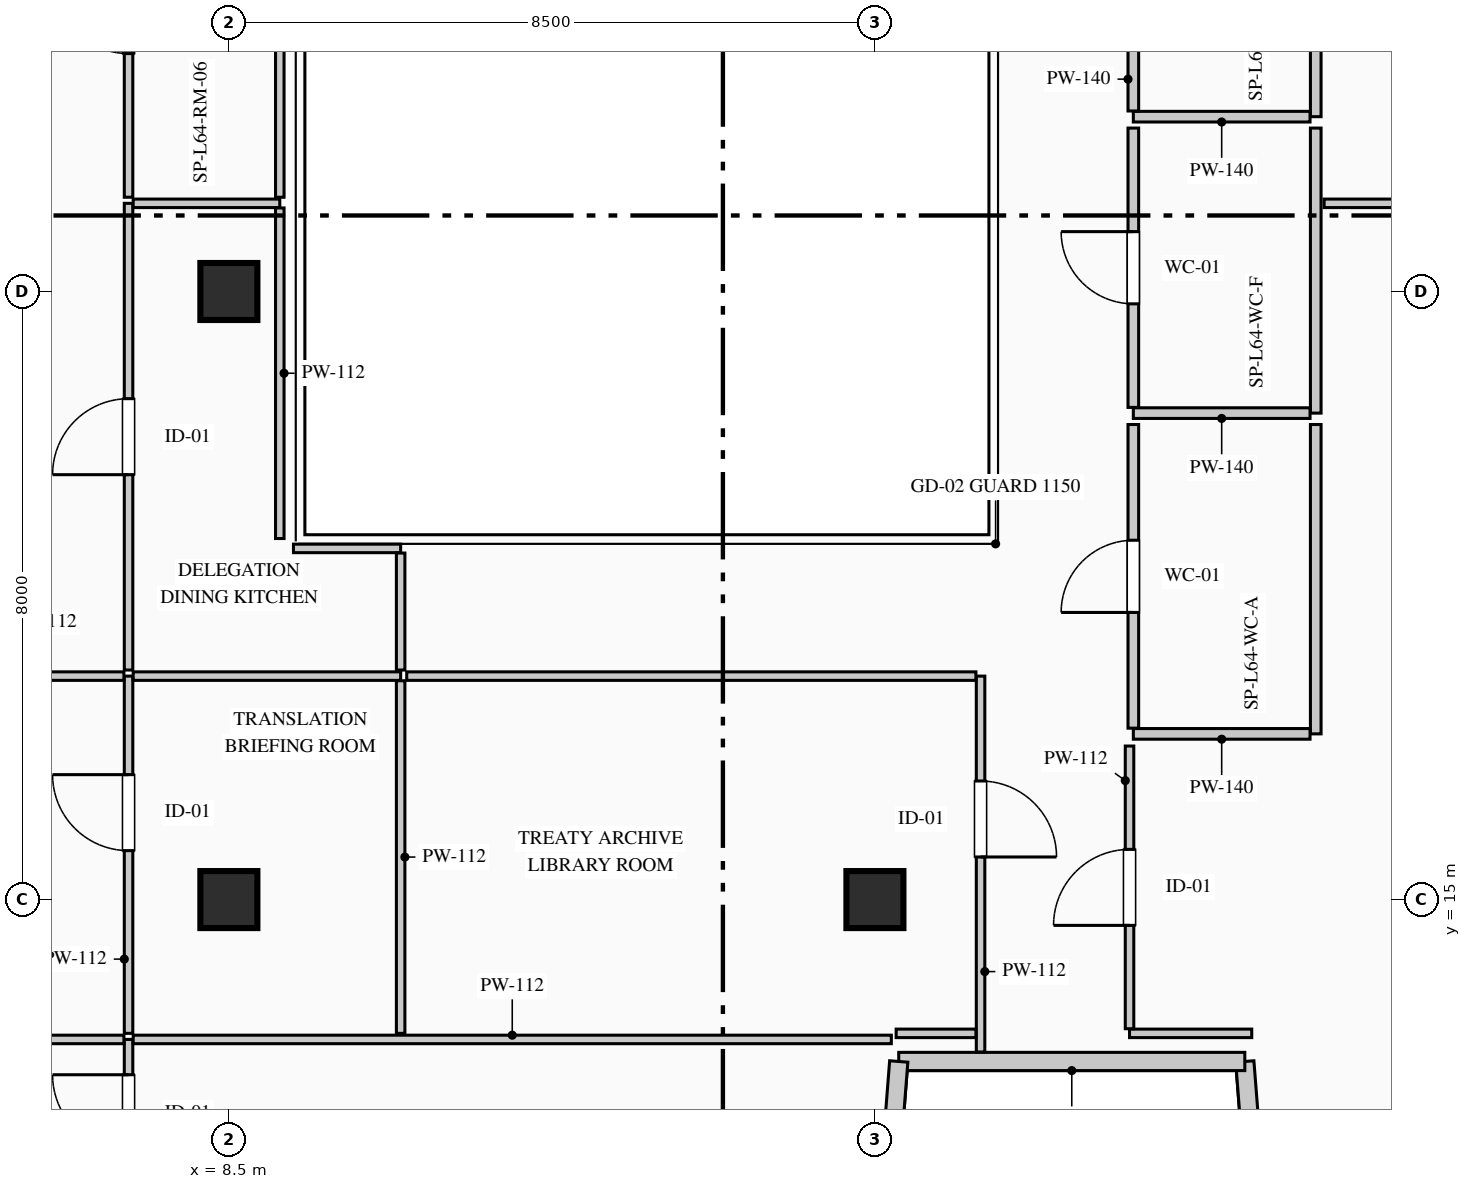
"""IFC4 building model, lengths in metres.
Left out: names, types, materials, properties, quantities, classifications, styles, units other than length and angle.
Written with IfcOpenShell. Run it as: python <this file> out.ifc"""

import sys

from ifc_helpers import new_model, si_unit, direction, frame, frame_2d, origin, origin_2d, place, context, subcontext, project, spatial, rectangle, extrude, element, fill, save


model = new_model("IFC4")
c1 = context("Model", 3, precision=1e-05, world=origin(), true_north=direction((0.0, 1.0)))
c2 = subcontext(c1, "Body", "Model", "MODEL_VIEW")
j1 = project(units=[si_unit("LENGTHUNIT", "METRE"), si_unit("PLANEANGLEUNIT", "RADIAN")], contexts=[c1])
p1 = place(None, origin())
s1 = spatial("IfcSite", under=j1, at=p1, CompositionType="ELEMENT")
p2 = place(p1, origin())
s2 = spatial("IfcBuilding", under=s1, at=p2, CompositionType="ELEMENT")
p3 = place(p2, frame((0.0, 0.0, 268.55)))
s3 = spatial("IfcBuildingStorey", under=s2, at=p3, CompositionType="ELEMENT", Elevation=268.55)
for number, where, z_axis, x_axis in (
    (1, (8.5, 15.0, 0.0), (0.0, 0.0, 1.0), (1.0, 0.0, 0.0)),
    (2, (8.5, 23.0, 0.0), (0.0, 0.0, 1.0), (1.0, 0.0, 0.0)),
    (3, (17.0, 15.0, 0.0), (0.0, 0.0, 1.0), (1.0, 0.0, 0.0)),
):
    element("IfcColumn", number, at=place(p3, frame(where, z_axis=z_axis, x_axis=x_axis)), inside=s3, PredefinedType="COLUMN", context=c2, shape_type="SweptSolid", body=[
        extrude(rectangle(XDim=0.75, YDim=0.75, at=origin_2d()), origin(), (0.0, 0.0, 1.0), 3.95),
    ])
p4 = place(p3, frame((6.133, 4.42, 0.0), z_axis=(0.0, 0.0, 1.0), x_axis=(-0.089522678378, 0.995984784048, 0.0)))
e4 = element("IfcWall", 4, at=p4, inside=s3, PredefinedType="STANDARD", context=c2, shape_type="SweptSolid", body=[
    extrude(rectangle(XDim=37.31, YDim=0.24, at=frame_2d((18.655, 0.0))), origin(), (0.0, 0.0, 1.0), 3.7),
])
p5 = place(p4, frame((10.246, 0.0, 0.9)))
e5 = element("IfcOpeningElement", 5, at=p5, cuts=e4, PredefinedType="OPENING", context=c2, shape_type="SweptSolid", body=[
    extrude(rectangle(XDim=1.65, YDim=1.95, at=frame_2d((0.825, 0.975))), frame((0.0, 0.13, 0.0), z_axis=(0.0, -1.0, 0.0), x_axis=(1.0, 0.0, 0.0)), (0.0, 0.0, 1.0), 0.26),
])
p6 = place(p3, frame((22.667, 2.62, 0.0), z_axis=(0.0, 0.0, 1.0), x_axis=(-0.077816860153, 0.996967670627, 0.0)))
e6 = element("IfcWall", 6, at=p6, inside=s3, PredefinedType="STANDARD", context=c2, shape_type="SweptSolid", body=[
    extrude(rectangle(XDim=10.281, YDim=0.24, at=frame_2d((5.141, 0.0))), origin(), (0.0, 0.0, 1.0), 3.7),
])
p7 = place(p6, frame((5.755, 0.0, 0.9)))
e7 = element("IfcOpeningElement", 7, at=p7, cuts=e6, PredefinedType="OPENING", context=c2, shape_type="SweptSolid", body=[
    extrude(rectangle(XDim=1.65, YDim=1.95, at=frame_2d((0.825, 0.975))), frame((0.0, 0.13, 0.0), z_axis=(0.0, -1.0, 0.0), x_axis=(1.0, 0.0, 0.0)), (0.0, 0.0, 1.0), 0.26),
])
p8 = place(p3, frame((21.867, 12.87, 0.0), z_axis=(0.0, 0.0, 1.0), x_axis=(-1.0, 0.0, 0.0)))
e8 = element("IfcWall", 8, at=p8, inside=s3, PredefinedType="STANDARD", context=c2, shape_type="SweptSolid", body=[
    extrude(rectangle(XDim=4.553, YDim=0.24, at=frame_2d((2.277, 0.0))), origin(), (0.0, 0.0, 1.0), 3.7),
])
p9 = place(p3, frame((17.313, 12.87, 0.0), z_axis=(0.0, 0.0, 1.0), x_axis=(-0.077816860153, -0.996967670627, 0.0)))
e9 = element("IfcWall", 9, at=p9, inside=s3, PredefinedType="STANDARD", context=c2, shape_type="SweptSolid", body=[
    extrude(rectangle(XDim=10.281, YDim=0.24, at=frame_2d((5.141, 0.0))), origin(), (0.0, 0.0, 1.0), 3.7),
])
p10 = place(p3, frame((22.8, 28.95, 0.0), z_axis=(0.0, 0.0, 1.0), x_axis=(0.0, -1.0, 0.0)))
e10 = element("IfcWall", 10, at=p10, inside=s3, PredefinedType="PARTITIONING", context=c2, shape_type="SweptSolid", body=[
    extrude(rectangle(XDim=3.65, YDim=0.14, at=frame_2d((1.825, 0.0))), origin(), (0.0, 0.0, 1.0), 3.285),
])
p11 = place(p3, frame((22.725, 25.3, 0.0), z_axis=(0.0, 0.0, 1.0), x_axis=(-1.0, 0.0, 0.0)))
e11 = element("IfcWall", 11, at=p11, inside=s3, PredefinedType="PARTITIONING", context=c2, shape_type="SweptSolid", body=[
    extrude(rectangle(XDim=2.325, YDim=0.14, at=frame_2d((1.163, 0.0))), origin(), (0.0, 0.0, 1.0), 3.7),
])
p12 = place(p3, frame((20.4, 25.375, 0.0), z_axis=(0.0, 0.0, 1.0), x_axis=(0.0, 1.0, 0.0)))
e12 = element("IfcWall", 12, at=p12, inside=s3, PredefinedType="PARTITIONING", context=c2, shape_type="SweptSolid", body=[
    extrude(rectangle(XDim=3.575, YDim=0.14, at=frame_2d((1.788, 0.0))), origin(), (0.0, 0.0, 1.0), 3.7),
])
p13 = place(p12, frame((1.312, 0.0, 0.0)))
e13 = element("IfcOpeningElement", 13, at=p13, cuts=e12, PredefinedType="OPENING", context=c2, shape_type="SweptSolid", body=[
    extrude(rectangle(XDim=0.95, YDim=2.15, at=frame_2d((0.475, 1.075))), frame((0.0, 0.08, 0.0), z_axis=(0.0, -1.0, 0.0), x_axis=(1.0, 0.0, 0.0)), (0.0, 0.0, 1.0), 0.16),
])
p14 = place(p3, frame((22.8, 25.15, 0.0), z_axis=(0.0, 0.0, 1.0), x_axis=(0.0, -1.0, 0.0)))
e14 = element("IfcWall", 14, at=p14, inside=s3, PredefinedType="PARTITIONING", context=c2, shape_type="SweptSolid", body=[
    extrude(rectangle(XDim=3.75, YDim=0.14, at=frame_2d((1.875, 0.0))), origin(), (0.0, 0.0, 1.0), 3.285),
])
p15 = place(p3, frame((22.725, 21.4, 0.0), z_axis=(0.0, 0.0, 1.0), x_axis=(-1.0, 0.0, 0.0)))
e15 = element("IfcWall", 15, at=p15, inside=s3, PredefinedType="PARTITIONING", context=c2, shape_type="SweptSolid", body=[
    extrude(rectangle(XDim=2.325, YDim=0.14, at=frame_2d((1.163, 0.0))), origin(), (0.0, 0.0, 1.0), 3.7),
])
p16 = place(p3, frame((20.4, 21.475, 0.0), z_axis=(0.0, 0.0, 1.0), x_axis=(0.0, 1.0, 0.0)))
e16 = element("IfcWall", 16, at=p16, inside=s3, PredefinedType="PARTITIONING", context=c2, shape_type="SweptSolid", body=[
    extrude(rectangle(XDim=3.675, YDim=0.14, at=frame_2d((1.837, 0.0))), origin(), (0.0, 0.0, 1.0), 3.7),
])
p17 = place(p16, frame((1.363, 0.0, 0.0)))
e17 = element("IfcOpeningElement", 17, at=p17, cuts=e16, PredefinedType="OPENING", context=c2, shape_type="SweptSolid", body=[
    extrude(rectangle(XDim=0.95, YDim=2.15, at=frame_2d((0.475, 1.075))), frame((0.0, 0.08, 0.0), z_axis=(0.0, -1.0, 0.0), x_axis=(1.0, 0.0, 0.0)), (0.0, 0.0, 1.0), 0.16),
])
p18 = place(p3, frame((22.8, 21.25, 0.0), z_axis=(0.0, 0.0, 1.0), x_axis=(0.0, -1.0, 0.0)))
e18 = element("IfcWall", 18, at=p18, inside=s3, PredefinedType="PARTITIONING", context=c2, shape_type="SweptSolid", body=[
    extrude(rectangle(XDim=4.07, YDim=0.14, at=frame_2d((2.035, 0.0))), origin(), (0.0, 0.0, 1.0), 3.285),
])
p19 = place(p3, frame((22.725, 17.18, 0.0), z_axis=(0.0, 0.0, 1.0), x_axis=(-1.0, 0.0, 0.0)))
e19 = element("IfcWall", 19, at=p19, inside=s3, PredefinedType="PARTITIONING", context=c2, shape_type="SweptSolid", body=[
    extrude(rectangle(XDim=2.325, YDim=0.14, at=frame_2d((1.163, 0.0))), origin(), (0.0, 0.0, 1.0), 3.7),
])
p20 = place(p3, frame((20.4, 17.255, 0.0), z_axis=(0.0, 0.0, 1.0), x_axis=(0.0, 1.0, 0.0)))
e20 = element("IfcWall", 20, at=p20, inside=s3, PredefinedType="PARTITIONING", context=c2, shape_type="SweptSolid", body=[
    extrude(rectangle(XDim=3.995, YDim=0.14, at=frame_2d((1.998, 0.0))), origin(), (0.0, 0.0, 1.0), 3.7),
])
p21 = place(p20, frame((1.522, 0.0, 0.0)))
e21 = element("IfcOpeningElement", 21, at=p21, cuts=e20, PredefinedType="OPENING", context=c2, shape_type="SweptSolid", body=[
    extrude(rectangle(XDim=0.95, YDim=2.15, at=frame_2d((0.475, 1.075))), frame((0.0, 0.08, 0.0), z_axis=(0.0, -1.0, 0.0), x_axis=(1.0, 0.0, 0.0)), (0.0, 0.0, 1.0), 0.16),
])
p22 = place(p3, frame((7.18, 11.231, 0.0), z_axis=(0.0, 0.0, 1.0), x_axis=(0.0, 1.0, 0.0)))
e22 = element("IfcWall", 22, at=p22, inside=s3, PredefinedType="PARTITIONING", context=c2, shape_type="SweptSolid", body=[
    extrude(rectangle(XDim=1.929, YDim=0.112, at=frame_2d((0.964, 0.0))), origin(), (0.0, 0.0, 1.0), 3.7),
])
p23 = place(p22, frame((0.465, 0.0, 0.0)))
e23 = element("IfcOpeningElement", 23, at=p23, cuts=e22, PredefinedType="OPENING", context=c2, shape_type="SweptSolid", body=[
    extrude(rectangle(XDim=1.0, YDim=2.15, at=frame_2d((0.5, 1.075))), frame((0.0, 0.066, 0.0), z_axis=(0.0, -1.0, 0.0), x_axis=(1.0, 0.0, 0.0)), (0.0, 0.0, 1.0), 0.132),
])
p24 = place(p3, frame((5.473, 13.16, 0.0), z_axis=(0.0, 0.0, 1.0), x_axis=(1.0, 0.0, 0.0)))
e24 = element("IfcWall", 24, at=p24, inside=s3, PredefinedType="PARTITIONING", context=c2, shape_type="SweptSolid", body=[
    extrude(rectangle(XDim=1.646, YDim=0.112, at=frame_2d((0.823, 0.0))), origin(), (0.0, 0.0, 1.0), 3.7),
])
p25 = place(p3, frame((7.241, 13.16, 0.0), z_axis=(0.0, 0.0, 1.0), x_axis=(1.0, 0.0, 0.0)))
e25 = element("IfcWall", 25, at=p25, inside=s3, PredefinedType="PARTITIONING", context=c2, shape_type="SweptSolid", body=[
    extrude(rectangle(XDim=9.975, YDim=0.112, at=frame_2d((4.988, 0.0))), origin(), (0.0, 0.0, 1.0), 3.7),
])
p26 = place(p3, frame((21.958, 13.24, 0.0), z_axis=(0.0, 0.0, 1.0), x_axis=(-1.0, 0.0, 0.0)))
e26 = element("IfcWall", 26, at=p26, inside=s3, PredefinedType="PARTITIONING", context=c2, shape_type="SweptSolid", body=[
    extrude(rectangle(XDim=1.608, YDim=0.112, at=frame_2d((0.804, 0.0))), origin(), (0.0, 0.0, 1.0), 3.7),
])
p27 = place(p3, frame((20.35, 13.301, 0.0), z_axis=(0.0, 0.0, 1.0), x_axis=(0.0, 1.0, 0.0)))
e27 = element("IfcWall", 27, at=p27, inside=s3, PredefinedType="PARTITIONING", context=c2, shape_type="SweptSolid", body=[
    extrude(rectangle(XDim=3.719, YDim=0.112, at=frame_2d((1.859, 0.0))), origin(), (0.0, 0.0, 1.0), 3.7),
])
p28 = place(p27, frame((1.36, 0.0, 0.0)))
e28 = element("IfcOpeningElement", 28, at=p28, cuts=e27, PredefinedType="OPENING", context=c2, shape_type="SweptSolid", body=[
    extrude(rectangle(XDim=1.0, YDim=2.15, at=frame_2d((0.5, 1.075))), frame((0.0, 0.066, 0.0), z_axis=(0.0, -1.0, 0.0), x_axis=(1.0, 0.0, 0.0)), (0.0, 0.0, 1.0), 0.132),
])
p29 = place(p3, frame((22.91, 24.16, 0.0), z_axis=(0.0, 0.0, 1.0), x_axis=(1.0, 0.0, 0.0)))
e29 = element("IfcWall", 29, at=p29, inside=s3, PredefinedType="PARTITIONING", context=c2, shape_type="SweptSolid", body=[
    extrude(rectangle(XDim=9.365, YDim=0.112, at=frame_2d((4.683, 0.0))), origin(), (0.0, 0.0, 1.0), 3.7),
])
p30 = place(p3, frame((7.18, 13.24, 0.0), z_axis=(0.0, 0.0, 1.0), x_axis=(0.0, 1.0, 0.0)))
e30 = element("IfcWall", 30, at=p30, inside=s3, PredefinedType="PARTITIONING", context=c2, shape_type="SweptSolid", body=[
    extrude(rectangle(XDim=4.7, YDim=0.112, at=frame_2d((2.35, 0.0))), origin(), (0.0, 0.0, 1.0), 3.7),
])
p31 = place(p30, frame((2.404, 0.0, 0.0)))
e31 = element("IfcOpeningElement", 31, at=p31, cuts=e30, PredefinedType="OPENING", context=c2, shape_type="SweptSolid", body=[
    extrude(rectangle(XDim=1.0, YDim=2.15, at=frame_2d((0.5, 1.075))), frame((0.0, 0.066, 0.0), z_axis=(0.0, -1.0, 0.0), x_axis=(1.0, 0.0, 0.0)), (0.0, 0.0, 1.0), 0.132),
])
p32 = place(p3, frame((5.044, 17.94, 0.0), z_axis=(0.0, 0.0, 1.0), x_axis=(1.0, 0.0, 0.0)))
e32 = element("IfcWall", 32, at=p32, inside=s3, PredefinedType="PARTITIONING", context=c2, shape_type="SweptSolid", body=[
    extrude(rectangle(XDim=2.075, YDim=0.112, at=frame_2d((1.038, 0.0))), origin(), (0.0, 0.0, 1.0), 3.7),
])
p33 = place(p3, frame((7.241, 17.94, 0.0), z_axis=(0.0, 0.0, 1.0), x_axis=(1.0, 0.0, 0.0)))
e33 = element("IfcWall", 33, at=p33, inside=s3, PredefinedType="PARTITIONING", context=c2, shape_type="SweptSolid", body=[
    extrude(rectangle(XDim=3.519, YDim=0.112, at=frame_2d((1.76, 0.0))), origin(), (0.0, 0.0, 1.0), 3.7),
])
p34 = place(p3, frame((10.76, 17.879, 0.0), z_axis=(0.0, 0.0, 1.0), x_axis=(0.0, -1.0, 0.0)))
e34 = element("IfcWall", 34, at=p34, inside=s3, PredefinedType="PARTITIONING", context=c2, shape_type="SweptSolid", body=[
    extrude(rectangle(XDim=4.639, YDim=0.112, at=frame_2d((2.319, 0.0))), origin(), (0.0, 0.0, 1.0), 3.7),
])
p35 = place(p3, frame((18.39, 17.94, 0.0), z_axis=(0.0, 0.0, 1.0), x_axis=(0.0, -1.0, 0.0)))
e35 = element("IfcWall", 35, at=p35, inside=s3, PredefinedType="PARTITIONING", context=c2, shape_type="SweptSolid", body=[
    extrude(rectangle(XDim=4.945, YDim=0.112, at=frame_2d((2.472, 0.0))), origin(), (0.0, 0.0, 1.0), 3.7),
])
p36 = place(p35, frame((1.38, 0.0, 0.0)))
e36 = element("IfcOpeningElement", 36, at=p36, cuts=e35, PredefinedType="OPENING", context=c2, shape_type="SweptSolid", body=[
    extrude(rectangle(XDim=1.0, YDim=2.15, at=frame_2d((0.5, 1.075))), frame((0.0, 0.066, 0.0), z_axis=(0.0, -1.0, 0.0), x_axis=(1.0, 0.0, 0.0)), (0.0, 0.0, 1.0), 0.132),
])
p37 = place(p3, frame((18.329, 13.24, 0.0), z_axis=(0.0, 0.0, 1.0), x_axis=(-1.0, 0.0, 0.0)))
e37 = element("IfcWall", 37, at=p37, inside=s3, PredefinedType="PARTITIONING", context=c2, shape_type="SweptSolid", body=[
    extrude(rectangle(XDim=1.05, YDim=0.112, at=frame_2d((0.525, 0.0))), origin(), (0.0, 0.0, 1.0), 3.7),
])
p38 = place(p3, frame((10.84, 17.94, 0.0), z_axis=(0.0, 0.0, 1.0), x_axis=(1.0, 0.0, 0.0)))
e38 = element("IfcWall", 38, at=p38, inside=s3, PredefinedType="PARTITIONING", context=c2, shape_type="SweptSolid", body=[
    extrude(rectangle(XDim=7.489, YDim=0.112, at=frame_2d((3.745, 0.0))), origin(), (0.0, 0.0, 1.0), 3.7),
])
p39 = place(p3, frame((9.35, 19.62, 0.0), z_axis=(0.0, 0.0, 1.0), x_axis=(1.0, 0.0, 0.0)))
e39 = element("IfcWall", 39, at=p39, inside=s3, PredefinedType="PARTITIONING", context=c2, shape_type="SweptSolid", body=[
    extrude(rectangle(XDim=1.41, YDim=0.112, at=frame_2d((0.705, 0.0))), origin(), (0.0, 0.0, 1.0), 3.7),
])
p40 = place(p3, frame((10.76, 19.559, 0.0), z_axis=(0.0, 0.0, 1.0), x_axis=(0.0, -1.0, 0.0)))
e40 = element("IfcWall", 40, at=p40, inside=s3, PredefinedType="PARTITIONING", context=c2, shape_type="SweptSolid", body=[
    extrude(rectangle(XDim=1.539, YDim=0.112, at=frame_2d((0.77, 0.0))), origin(), (0.0, 0.0, 1.0), 3.7),
])
p41 = place(p3, frame((7.18, 18.02, 0.0), z_axis=(0.0, 0.0, 1.0), x_axis=(0.0, 1.0, 0.0)))
e41 = element("IfcWall", 41, at=p41, inside=s3, PredefinedType="PARTITIONING", context=c2, shape_type="SweptSolid", body=[
    extrude(rectangle(XDim=6.14, YDim=0.112, at=frame_2d((3.07, 0.0))), origin(), (0.0, 0.0, 1.0), 3.7),
])
p42 = place(p41, frame((2.57, 0.0, 0.0)))
e42 = element("IfcOpeningElement", 42, at=p42, cuts=e41, PredefinedType="OPENING", context=c2, shape_type="SweptSolid", body=[
    extrude(rectangle(XDim=1.0, YDim=2.15, at=frame_2d((0.5, 1.075))), frame((0.0, 0.066, 0.0), z_axis=(0.0, -1.0, 0.0), x_axis=(1.0, 0.0, 0.0)), (0.0, 0.0, 1.0), 0.132),
])
p43 = place(p3, frame((7.241, 24.16, 0.0), z_axis=(0.0, 0.0, 1.0), x_axis=(1.0, 0.0, 0.0)))
e43 = element("IfcWall", 43, at=p43, inside=s3, PredefinedType="PARTITIONING", context=c2, shape_type="SweptSolid", body=[
    extrude(rectangle(XDim=1.929, YDim=0.112, at=frame_2d((0.964, 0.0))), origin(), (0.0, 0.0, 1.0), 3.7),
])
p44 = place(p3, frame((9.17, 24.099, 0.0), z_axis=(0.0, 0.0, 1.0), x_axis=(0.0, -1.0, 0.0)))
e44 = element("IfcWall", 44, at=p44, inside=s3, PredefinedType="PARTITIONING", context=c2, shape_type="SweptSolid", body=[
    extrude(rectangle(XDim=4.349, YDim=0.112, at=frame_2d((2.175, 0.0))), origin(), (0.0, 0.0, 1.0), 3.285),
])
p45 = place(p3, frame((7.18, 24.24, 0.0), z_axis=(0.0, 0.0, 1.0), x_axis=(0.0, 1.0, 0.0)))
e45 = element("IfcWall", 45, at=p45, inside=s3, PredefinedType="PARTITIONING", context=c2, shape_type="SweptSolid", body=[
    extrude(rectangle(XDim=4.78, YDim=0.112, at=frame_2d((2.39, 0.0))), origin(), (0.0, 0.0, 1.0), 3.7),
])
p46 = place(p45, frame((1.89, 0.0, 0.0)))
e46 = element("IfcOpeningElement", 46, at=p46, cuts=e45, PredefinedType="OPENING", context=c2, shape_type="SweptSolid", body=[
    extrude(rectangle(XDim=1.0, YDim=2.15, at=frame_2d((0.5, 1.075))), frame((0.0, 0.066, 0.0), z_axis=(0.0, -1.0, 0.0), x_axis=(1.0, 0.0, 0.0)), (0.0, 0.0, 1.0), 0.132),
])
p47 = place(p3, frame((9.17, 28.959, 0.0), z_axis=(0.0, 0.0, 1.0), x_axis=(0.0, -1.0, 0.0)))
e47 = element("IfcWall", 47, at=p47, inside=s3, PredefinedType="PARTITIONING", context=c2, shape_type="SweptSolid", body=[
    extrude(rectangle(XDim=4.719, YDim=0.112, at=frame_2d((2.359, 0.0))), origin(), (0.0, 0.0, 1.0), 3.285),
])
p48 = place(p17, origin())
e48 = element("IfcDoor", 48, at=p48, inside=s3, OperationType="SINGLE_SWING_RIGHT", PredefinedType="DOOR", context=c2, shape_type="SweptSolid", body=[
    extrude(rectangle(XDim=0.95, YDim=2.15, at=frame_2d((0.475, 1.075))), frame((0.0, 0.025, 0.0), z_axis=(0.0, -1.0, 0.0), x_axis=(1.0, 0.0, 0.0)), (0.0, 0.0, 1.0), 0.05),
])
fill(e17, e48)
p49 = place(p21, origin())
e49 = element("IfcDoor", 49, at=p49, inside=s3, OperationType="SINGLE_SWING_LEFT", PredefinedType="DOOR", context=c2, shape_type="SweptSolid", body=[
    extrude(rectangle(XDim=0.95, YDim=2.15, at=frame_2d((0.475, 1.075))), frame((0.0, 0.025, 0.0), z_axis=(0.0, -1.0, 0.0), x_axis=(1.0, 0.0, 0.0)), (0.0, 0.0, 1.0), 0.05),
])
fill(e21, e49)
p50 = place(p23, origin())
e50 = element("IfcDoor", 50, at=p50, inside=s3, OperationType="SINGLE_SWING_RIGHT", PredefinedType="DOOR", context=c2, shape_type="SweptSolid", body=[
    extrude(rectangle(XDim=1.0, YDim=2.15, at=frame_2d((0.5, 1.075))), frame((0.0, 0.025, 0.0), z_axis=(0.0, -1.0, 0.0), x_axis=(1.0, 0.0, 0.0)), (0.0, 0.0, 1.0), 0.05),
])
fill(e23, e50)
p51 = place(p28, origin())
e51 = element("IfcDoor", 51, at=p51, inside=s3, OperationType="SINGLE_SWING_LEFT", PredefinedType="DOOR", context=c2, shape_type="SweptSolid", body=[
    extrude(rectangle(XDim=1.0, YDim=2.15, at=frame_2d((0.5, 1.075))), frame((0.0, 0.025, 0.0), z_axis=(0.0, -1.0, 0.0), x_axis=(1.0, 0.0, 0.0)), (0.0, 0.0, 1.0), 0.05),
])
fill(e28, e51)
p52 = place(p31, origin())
e52 = element("IfcDoor", 52, at=p52, inside=s3, OperationType="SINGLE_SWING_RIGHT", PredefinedType="DOOR", context=c2, shape_type="SweptSolid", body=[
    extrude(rectangle(XDim=1.0, YDim=2.15, at=frame_2d((0.5, 1.075))), frame((0.0, 0.025, 0.0), z_axis=(0.0, -1.0, 0.0), x_axis=(1.0, 0.0, 0.0)), (0.0, 0.0, 1.0), 0.05),
])
fill(e31, e52)
p53 = place(p36, origin())
e53 = element("IfcDoor", 53, at=p53, inside=s3, OperationType="SINGLE_SWING_RIGHT", PredefinedType="DOOR", context=c2, shape_type="SweptSolid", body=[
    extrude(rectangle(XDim=1.0, YDim=2.15, at=frame_2d((0.5, 1.075))), frame((0.0, 0.025, 0.0), z_axis=(0.0, -1.0, 0.0), x_axis=(1.0, 0.0, 0.0)), (0.0, 0.0, 1.0), 0.05),
])
fill(e36, e53)
p54 = place(p42, origin())
e54 = element("IfcDoor", 54, at=p54, inside=s3, OperationType="SINGLE_SWING_LEFT", PredefinedType="DOOR", context=c2, shape_type="SweptSolid", body=[
    extrude(rectangle(XDim=1.0, YDim=2.15, at=frame_2d((0.5, 1.075))), frame((0.0, 0.025, 0.0), z_axis=(0.0, -1.0, 0.0), x_axis=(1.0, 0.0, 0.0)), (0.0, 0.0, 1.0), 0.05),
])
fill(e42, e54)
p55 = place(p46, origin())
e55 = element("IfcDoor", 55, at=p55, inside=s3, OperationType="SINGLE_SWING_RIGHT", PredefinedType="DOOR", context=c2, shape_type="SweptSolid", body=[
    extrude(rectangle(XDim=1.0, YDim=2.15, at=frame_2d((0.5, 1.075))), frame((0.0, 0.025, 0.0), z_axis=(0.0, -1.0, 0.0), x_axis=(1.0, 0.0, 0.0)), (0.0, 0.0, 1.0), 0.05),
])
fill(e46, e55)
save(model, sys.argv[1])
